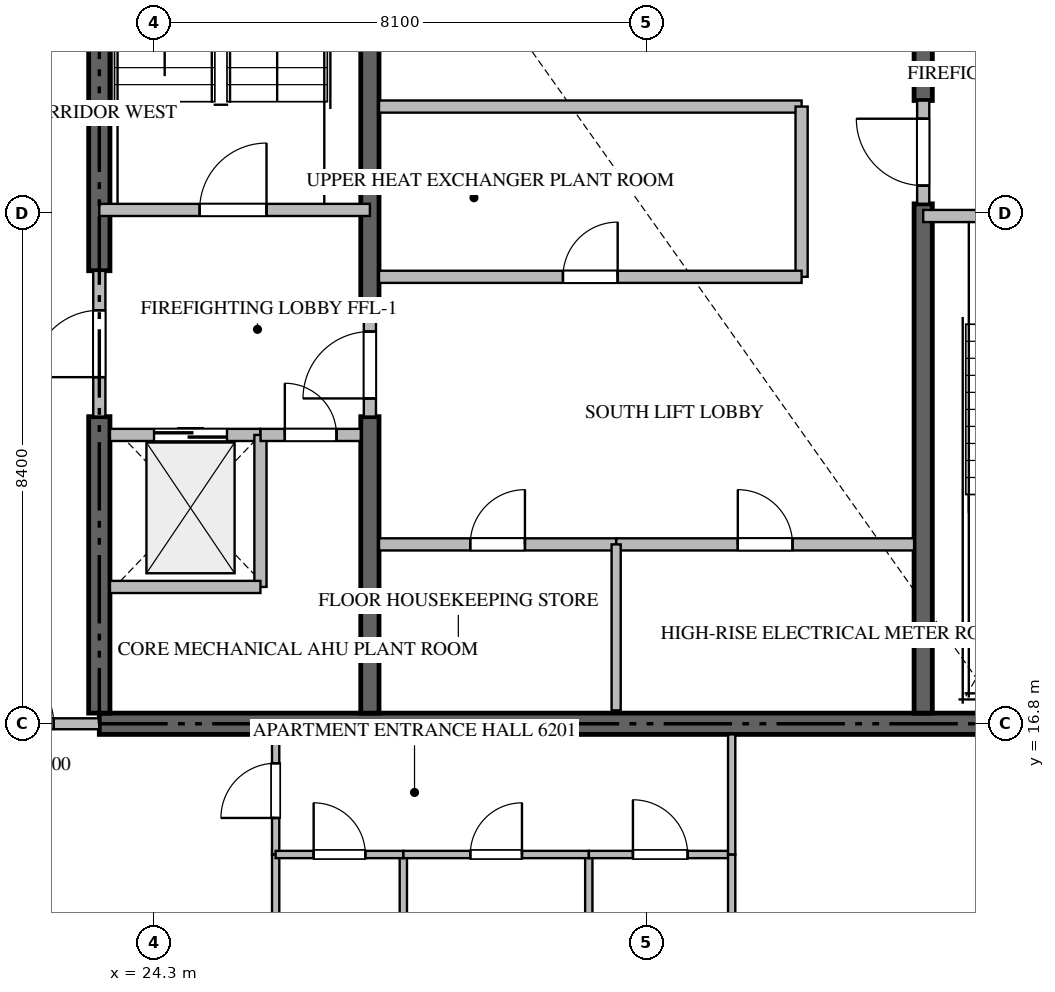
"""IFC4 building model, lengths in metres.
Left out: names, types, materials, properties, quantities, classifications, styles, units other than length and angle.
Written with IfcOpenShell. Run it as: python <this file> out.ifc"""

import sys

from ifc_helpers import new_model, si_unit, direction, frame, frame_2d, origin, place, context, subcontext, project, spatial, rectangle, extrude, source, transform, mapped, element, fill, save


model = new_model("IFC4")
c1 = context("Model", 3, precision=1e-05, world=origin(), true_north=direction((0.0, 1.0)))
c2 = subcontext(c1, "Body", "Model", "MODEL_VIEW")
j1 = project(units=[si_unit("LENGTHUNIT", "METRE"), si_unit("PLANEANGLEUNIT", "RADIAN")], contexts=[c1])
p1 = place(None, origin())
s1 = spatial("IfcSite", under=j1, at=p1, CompositionType="ELEMENT")
p2 = place(p1, origin())
s2 = spatial("IfcBuilding", under=s1, at=p2, CompositionType="ELEMENT")
p3 = place(p2, frame((0.0, 0.0, 248.95)))
s3 = spatial("IfcBuildingStorey", under=s2, at=p3, CompositionType="ELEMENT", Elevation=248.95)
p4 = place(p3, frame((23.4, 16.8, -0.26), z_axis=(0.0, 0.0, 1.0), x_axis=(1.0, 0.0, 0.0)))
e1 = element("IfcWall", 1, at=p4, inside=s3, PredefinedType="SHEAR", context=c2, shape_type="SweptSolid", body=[
    extrude(rectangle(XDim=18.0, YDim=0.35, at=frame_2d((9.0, 0.0))), origin(), (0.0, 0.0, 1.0), 3.848),
])
p5 = place(p3, frame((23.4, 16.975, -0.26), z_axis=(0.0, 0.0, 1.0), x_axis=(0.0, 1.0, 0.0)))
e2 = element("IfcWall", 2, at=p5, inside=s3, PredefinedType="SHEAR", context=c2, shape_type="SweptSolid", body=[
    extrude(rectangle(XDim=4.875, YDim=0.35, at=frame_2d((2.438, 0.0))), origin(), (0.0, 0.0, 1.0), 3.848),
])
p6 = place(p3, frame((23.4, 24.25, -0.26), z_axis=(0.0, 0.0, 1.0), x_axis=(0.0, 1.0, 0.0)))
e3 = element("IfcWall", 3, at=p6, inside=s3, PredefinedType="SHEAR", context=c2, shape_type="SweptSolid", body=[
    extrude(rectangle(XDim=9.175, YDim=0.35, at=frame_2d((4.587, 0.0))), origin(), (0.0, 0.0, 1.0), 3.848),
])
p7 = place(p3, frame((27.85, 16.975, -0.26), z_axis=(0.0, 0.0, 1.0), x_axis=(0.0, 1.0, 0.0)))
e4 = element("IfcWall", 4, at=p7, inside=s3, PredefinedType="SHEAR", context=c2, shape_type="SweptSolid", body=[
    extrude(rectangle(XDim=4.875, YDim=0.3, at=frame_2d((2.438, 0.0))), origin(), (0.0, 0.0, 1.0), 3.848),
])
p8 = place(p3, frame((27.85, 23.55, -0.26), z_axis=(0.0, 0.0, 1.0), x_axis=(0.0, 1.0, 0.0)))
e5 = element("IfcWall", 5, at=p8, inside=s3, PredefinedType="SHEAR", context=c2, shape_type="SweptSolid", body=[
    extrude(rectangle(XDim=9.875, YDim=0.3, at=frame_2d((4.938, 0.0))), origin(), (0.0, 0.0, 1.0), 3.848),
])
p9 = place(p3, frame((36.95, 16.975, -0.26), z_axis=(0.0, 0.0, 1.0), x_axis=(0.0, 1.0, 0.0)))
e6 = element("IfcWall", 6, at=p9, inside=s3, PredefinedType="SHEAR", context=c2, shape_type="SweptSolid", body=[
    extrude(rectangle(XDim=8.375, YDim=0.3, at=frame_2d((4.188, 0.0))), origin(), (0.0, 0.0, 1.0), 3.848),
])
p10 = place(p3, frame((36.95, 27.05, -0.26), z_axis=(0.0, 0.0, 1.0), x_axis=(0.0, 1.0, 0.0)))
e7 = element("IfcWall", 7, at=p10, inside=s3, PredefinedType="SHEAR", context=c2, shape_type="SweptSolid", body=[
    extrude(rectangle(XDim=6.375, YDim=0.3, at=frame_2d((3.188, 0.0))), origin(), (0.0, 0.0, 1.0), 3.848),
])
p11 = place(p3, frame((23.4, 25.25, 0.0), z_axis=(0.0, 0.0, 1.0), x_axis=(1.0, 0.0, 0.0)))
e8 = element("IfcWall", 8, at=p11, inside=s3, PredefinedType="STANDARD", context=c2, shape_type="SweptSolid", body=[
    extrude(rectangle(XDim=4.45, YDim=0.2, at=frame_2d((2.225, 0.0))), origin(), (0.0, 0.0, 1.0), 3.59),
])
p12 = place(p11, frame((1.65, 0.0, 0.0)))
e9 = element("IfcOpeningElement", 9, at=p12, cuts=e8, PredefinedType="OPENING", context=c2, shape_type="SweptSolid", body=[
    extrude(rectangle(XDim=1.1, YDim=2.15, at=frame_2d((0.55, 1.075))), frame((0.0, 0.11, 0.0), z_axis=(0.0, -1.0, 0.0), x_axis=(1.0, 0.0, 0.0)), (0.0, 0.0, 1.0), 0.22),
])
p13 = place(p3, frame((36.95, 25.15, 0.0), z_axis=(0.0, 0.0, 1.0), x_axis=(1.0, 0.0, 0.0)))
e10 = element("IfcWall", 10, at=p13, inside=s3, PredefinedType="STANDARD", context=c2, shape_type="SweptSolid", body=[
    extrude(rectangle(XDim=4.45, YDim=0.2, at=frame_2d((2.225, 0.0))), origin(), (0.0, 0.0, 1.0), 3.59),
])
p14 = place(p13, frame((1.65, 0.0, 0.0)))
e11 = element("IfcOpeningElement", 11, at=p14, cuts=e10, PredefinedType="OPENING", context=c2, shape_type="SweptSolid", body=[
    extrude(rectangle(XDim=1.1, YDim=2.15, at=frame_2d((0.55, 1.075))), frame((0.0, 0.11, 0.0), z_axis=(0.0, -1.0, 0.0), x_axis=(1.0, 0.0, 0.0)), (0.0, 0.0, 1.0), 0.22),
])
p15 = place(p3, frame((23.575, 21.55, 0.0), z_axis=(0.0, 0.0, 1.0), x_axis=(1.0, 0.0, 0.0)))
e12 = element("IfcWall", 12, at=p15, inside=s3, PredefinedType="STANDARD", context=c2, shape_type="SweptSolid", body=[
    extrude(rectangle(XDim=2.475, YDim=0.2, at=frame_2d((1.238, 0.0))), origin(), (0.0, 0.0, 1.0), 3.59),
])
p16 = place(p15, frame((0.725, 0.0, 0.0)))
e13 = element("IfcOpeningElement", 13, at=p16, cuts=e12, PredefinedType="OPENING", context=c2, shape_type="SweptSolid", body=[
    extrude(rectangle(XDim=1.2, YDim=2.2, at=frame_2d((0.6, 1.1))), frame((0.0, 0.11, 0.0), z_axis=(0.0, -1.0, 0.0), x_axis=(1.0, 0.0, 0.0)), (0.0, 0.0, 1.0), 0.22),
])
p17 = place(p3, frame((26.05, 19.05, 0.0), z_axis=(0.0, 0.0, 1.0), x_axis=(0.0, 1.0, 0.0)))
e14 = element("IfcWall", 14, at=p17, inside=s3, PredefinedType="STANDARD", context=c2, shape_type="SweptSolid", body=[
    extrude(rectangle(XDim=2.5, YDim=0.2, at=frame_2d((1.25, 0.0))), origin(), (0.0, 0.0, 1.0), 3.59),
])
p18 = place(p3, frame((23.575, 19.05, 0.0), z_axis=(0.0, 0.0, 1.0), x_axis=(1.0, 0.0, 0.0)))
e15 = element("IfcWall", 15, at=p18, inside=s3, PredefinedType="STANDARD", context=c2, shape_type="SweptSolid", body=[
    extrude(rectangle(XDim=2.475, YDim=0.2, at=frame_2d((1.238, 0.0))), origin(), (0.0, 0.0, 1.0), 3.59),
])
p19 = place(p3, frame((26.052, 21.55, 0.0), z_axis=(0.0, 0.0, 1.0), x_axis=(1.0, 0.0, 0.0)))
e16 = element("IfcWall", 16, at=p19, inside=s3, PredefinedType="STANDARD", context=c2, shape_type="SweptSolid", body=[
    extrude(rectangle(XDim=1.648, YDim=0.2, at=frame_2d((0.824, 0.0))), origin(), (0.0, 0.0, 1.0), 3.59),
])
p20 = place(p19, frame((0.399, 0.0, 0.0)))
e17 = element("IfcOpeningElement", 17, at=p20, cuts=e16, PredefinedType="OPENING", context=c2, shape_type="SweptSolid", body=[
    extrude(rectangle(XDim=0.85, YDim=2.1, at=frame_2d((0.425, 1.05))), frame((0.0, 0.11, 0.0), z_axis=(0.0, -1.0, 0.0), x_axis=(1.0, 0.0, 0.0)), (0.0, 0.0, 1.0), 0.22),
])
p21 = place(p3, frame((23.4, 21.852, 0.0), z_axis=(0.0, 0.0, 1.0), x_axis=(0.0, 1.0, 0.0)))
e18 = element("IfcWall", 18, at=p21, inside=s3, PredefinedType="STANDARD", context=c2, shape_type="SweptSolid", body=[
    extrude(rectangle(XDim=2.396, YDim=0.2, at=frame_2d((1.198, 0.0))), origin(), (0.0, 0.0, 1.0), 3.59),
])
p22 = place(p21, frame((0.648, 0.0, 0.0)))
e19 = element("IfcOpeningElement", 19, at=p22, cuts=e18, PredefinedType="OPENING", context=c2, shape_type="SweptSolid", body=[
    extrude(rectangle(XDim=1.1, YDim=2.15, at=frame_2d((0.55, 1.075))), frame((0.0, 0.11, 0.0), z_axis=(0.0, -1.0, 0.0), x_axis=(1.0, 0.0, 0.0)), (0.0, 0.0, 1.0), 0.22),
])
p23 = place(p3, frame((27.85, 21.852, 0.0), z_axis=(0.0, 0.0, 1.0), x_axis=(0.0, 1.0, 0.0)))
e20 = element("IfcWall", 20, at=p23, inside=s3, PredefinedType="STANDARD", context=c2, shape_type="SweptSolid", body=[
    extrude(rectangle(XDim=1.696, YDim=0.2, at=frame_2d((0.848, 0.0))), origin(), (0.0, 0.0, 1.0), 3.59),
])
p24 = place(p23, frame((0.298, 0.0, 0.0)))
e21 = element("IfcOpeningElement", 21, at=p24, cuts=e20, PredefinedType="OPENING", context=c2, shape_type="SweptSolid", body=[
    extrude(rectangle(XDim=1.1, YDim=2.15, at=frame_2d((0.55, 1.075))), frame((0.0, 0.11, 0.0), z_axis=(0.0, -1.0, 0.0), x_axis=(1.0, 0.0, 0.0)), (0.0, 0.0, 1.0), 0.22),
])
p25 = place(p3, frame((36.95, 25.352, 0.0), z_axis=(0.0, 0.0, 1.0), x_axis=(0.0, 1.0, 0.0)))
e22 = element("IfcWall", 22, at=p25, inside=s3, PredefinedType="STANDARD", context=c2, shape_type="SweptSolid", body=[
    extrude(rectangle(XDim=1.696, YDim=0.2, at=frame_2d((0.848, 0.0))), origin(), (0.0, 0.0, 1.0), 3.59),
])
p26 = place(p25, frame((0.298, 0.0, 0.0)))
e23 = element("IfcOpeningElement", 23, at=p26, cuts=e22, PredefinedType="OPENING", context=c2, shape_type="SweptSolid", body=[
    extrude(rectangle(XDim=1.1, YDim=2.15, at=frame_2d((0.55, 1.075))), frame((0.0, 0.11, 0.0), z_axis=(0.0, -1.0, 0.0), x_axis=(1.0, 0.0, 0.0)), (0.0, 0.0, 1.0), 0.22),
])
p27 = place(p3, frame((28.0, 19.75, 0.0), z_axis=(0.0, 0.0, 1.0), x_axis=(1.0, 0.0, 0.0)))
e24 = element("IfcWall", 24, at=p27, inside=s3, PredefinedType="STANDARD", context=c2, shape_type="SweptSolid", body=[
    extrude(rectangle(XDim=3.9, YDim=0.2, at=frame_2d((1.95, 0.0))), origin(), (0.0, 0.0, 1.0), 3.59),
])
p28 = place(p27, frame((1.5, 0.0, 0.0)))
e25 = element("IfcOpeningElement", 25, at=p28, cuts=e24, PredefinedType="OPENING", context=c2, shape_type="SweptSolid", body=[
    extrude(rectangle(XDim=0.9, YDim=2.1, at=frame_2d((0.45, 1.05))), frame((0.0, 0.11, 0.0), z_axis=(0.0, -1.0, 0.0), x_axis=(1.0, 0.0, 0.0)), (0.0, 0.0, 1.0), 0.22),
])
p29 = place(p3, frame((31.902, 19.75, 0.0), z_axis=(0.0, 0.0, 1.0), x_axis=(1.0, 0.0, 0.0)))
e26 = element("IfcWall", 26, at=p29, inside=s3, PredefinedType="STANDARD", context=c2, shape_type="SweptSolid", body=[
    extrude(rectangle(XDim=4.898, YDim=0.2, at=frame_2d((2.449, 0.0))), origin(), (0.0, 0.0, 1.0), 3.59),
])
p30 = place(p29, frame((1.999, 0.0, 0.0)))
e27 = element("IfcOpeningElement", 27, at=p30, cuts=e26, PredefinedType="OPENING", context=c2, shape_type="SweptSolid", body=[
    extrude(rectangle(XDim=0.9, YDim=2.1, at=frame_2d((0.45, 1.05))), frame((0.0, 0.11, 0.0), z_axis=(0.0, -1.0, 0.0), x_axis=(1.0, 0.0, 0.0)), (0.0, 0.0, 1.0), 0.22),
])
p31 = place(p3, frame((31.9, 17.02, 0.0), z_axis=(0.0, 0.0, 1.0), x_axis=(0.0, 1.0, 0.0)))
e28 = element("IfcWall", 28, at=p31, inside=s3, PredefinedType="PARTITIONING", context=c2, shape_type="SweptSolid", body=[
    extrude(rectangle(XDim=2.73, YDim=0.15, at=frame_2d((1.365, 0.0))), origin(), (0.0, 0.0, 1.0), 3.59),
])
p32 = place(p3, frame((28.0, 26.95, 0.0), z_axis=(0.0, 0.0, 1.0), x_axis=(1.0, 0.0, 0.0)))
e29 = element("IfcWall", 29, at=p32, inside=s3, PredefinedType="STANDARD", context=c2, shape_type="SweptSolid", body=[
    extrude(rectangle(XDim=6.95, YDim=0.2, at=frame_2d((3.475, 0.0))), origin(), (0.0, 0.0, 1.0), 3.59),
])
p33 = place(p3, frame((34.95, 24.15, 0.0), z_axis=(0.0, 0.0, 1.0), x_axis=(0.0, 1.0, 0.0)))
e30 = element("IfcWall", 30, at=p33, inside=s3, PredefinedType="STANDARD", context=c2, shape_type="SweptSolid", body=[
    extrude(rectangle(XDim=2.8, YDim=0.2, at=frame_2d((1.4, 0.0))), origin(), (0.0, 0.0, 1.0), 3.59),
])
p34 = place(p3, frame((28.0, 24.15, 0.0), z_axis=(0.0, 0.0, 1.0), x_axis=(1.0, 0.0, 0.0)))
e31 = element("IfcWall", 31, at=p34, inside=s3, PredefinedType="STANDARD", context=c2, shape_type="SweptSolid", body=[
    extrude(rectangle(XDim=6.95, YDim=0.2, at=frame_2d((3.475, 0.0))), origin(), (0.0, 0.0, 1.0), 3.59),
])
p35 = place(p34, frame((3.025, 0.0, 0.0)))
e32 = element("IfcOpeningElement", 32, at=p35, cuts=e31, PredefinedType="OPENING", context=c2, shape_type="SweptSolid", body=[
    extrude(rectangle(XDim=0.9, YDim=2.1, at=frame_2d((0.45, 1.05))), frame((0.0, 0.11, 0.0), z_axis=(0.0, -1.0, 0.0), x_axis=(1.0, 0.0, 0.0)), (0.0, 0.0, 1.0), 0.22),
])
p36 = place(p3, frame((20.902, 16.8, 0.0), z_axis=(0.0, 0.0, 1.0), x_axis=(1.0, 0.0, 0.0)))
e33 = element("IfcWall", 33, at=p36, inside=s3, PredefinedType="PARTITIONING", context=c2, shape_type="SweptSolid", body=[
    extrude(rectangle(XDim=2.496, YDim=0.18, at=frame_2d((1.248, 0.0))), origin(), (0.0, 0.0, 1.0), 3.59),
])
p37 = place(p36, frame((0.748, 0.0, 0.0)))
e34 = element("IfcOpeningElement", 34, at=p37, cuts=e33, PredefinedType="OPENING", context=c2, shape_type="SweptSolid", body=[
    extrude(rectangle(XDim=1.0, YDim=2.15, at=frame_2d((0.5, 1.075))), frame((0.0, 0.1, 0.0), z_axis=(0.0, -1.0, 0.0), x_axis=(1.0, 0.0, 0.0)), (0.0, 0.0, 1.0), 0.2),
])
p38 = place(p3, frame((26.3, 14.65, 0.0), z_axis=(0.0, 0.0, 1.0), x_axis=(0.0, 1.0, 0.0)))
e35 = element("IfcWall", 35, at=p38, inside=s3, PredefinedType="PARTITIONING", context=c2, shape_type="SweptSolid", body=[
    extrude(rectangle(XDim=1.975, YDim=0.12, at=frame_2d((0.988, 0.0))), origin(), (0.0, 0.0, 1.0), 3.59),
])
p39 = place(p38, frame((0.601, 0.0, 0.0)))
e36 = element("IfcOpeningElement", 36, at=p39, cuts=e35, PredefinedType="OPENING", context=c2, shape_type="SweptSolid", body=[
    extrude(rectangle(XDim=0.9, YDim=2.1, at=frame_2d((0.45, 1.05))), frame((0.0, 0.07, 0.0), z_axis=(0.0, -1.0, 0.0), x_axis=(1.0, 0.0, 0.0)), (0.0, 0.0, 1.0), 0.14),
])
p40 = place(p3, frame((26.3, 7.862, 0.0), z_axis=(0.0, 0.0, 1.0), x_axis=(0.0, 1.0, 0.0)))
e37 = element("IfcWall", 37, at=p40, inside=s3, PredefinedType="PARTITIONING", context=c2, shape_type="SweptSolid", body=[
    extrude(rectangle(XDim=6.786, YDim=0.12, at=frame_2d((3.393, 0.0))), origin(), (0.0, 0.0, 1.0), 3.59),
])
p41 = place(p3, frame((31.45, 1.295, 0.0), z_axis=(0.0, 0.0, 1.0), x_axis=(0.0, 1.0, 0.0)))
e38 = element("IfcWall", 38, at=p41, inside=s3, PredefinedType="PARTITIONING", context=c2, shape_type="SweptSolid", body=[
    extrude(rectangle(XDim=13.355, YDim=0.12, at=frame_2d((6.677, 0.0))), origin(), (0.0, 0.0, 1.0), 3.59),
])
p42 = place(p3, frame((28.4, 7.86, 0.0), z_axis=(0.0, 0.0, 1.0), x_axis=(0.0, 1.0, 0.0)))
e39 = element("IfcWall", 39, at=p42, inside=s3, PredefinedType="PARTITIONING", context=c2, shape_type="SweptSolid", body=[
    extrude(rectangle(XDim=6.79, YDim=0.12, at=frame_2d((3.395, 0.0))), origin(), (0.0, 0.0, 1.0), 3.59),
])
p43 = place(p3, frame((26.3, 14.65, 0.0), z_axis=(0.0, 0.0, 1.0), x_axis=(1.0, 0.0, 0.0)))
e40 = element("IfcWall", 40, at=p43, inside=s3, PredefinedType="PARTITIONING", context=c2, shape_type="SweptSolid", body=[
    extrude(rectangle(XDim=2.1, YDim=0.12, at=frame_2d((1.05, 0.0))), origin(), (0.0, 0.0, 1.0), 3.59),
])
p44 = place(p43, frame((0.625, 0.0, 0.0)))
e41 = element("IfcOpeningElement", 41, at=p44, cuts=e40, PredefinedType="OPENING", context=c2, shape_type="SweptSolid", body=[
    extrude(rectangle(XDim=0.85, YDim=2.1, at=frame_2d((0.425, 1.05))), frame((0.0, 0.07, 0.0), z_axis=(0.0, -1.0, 0.0), x_axis=(1.0, 0.0, 0.0)), (0.0, 0.0, 1.0), 0.14),
])
p45 = place(p3, frame((28.402, 14.65, 0.0), z_axis=(0.0, 0.0, 1.0), x_axis=(1.0, 0.0, 0.0)))
e42 = element("IfcWall", 42, at=p45, inside=s3, PredefinedType="PARTITIONING", context=c2, shape_type="SweptSolid", body=[
    extrude(rectangle(XDim=3.048, YDim=0.12, at=frame_2d((1.524, 0.0))), origin(), (0.0, 0.0, 1.0), 3.59),
])
p46 = place(p45, frame((1.099, 0.0, 0.0)))
e43 = element("IfcOpeningElement", 43, at=p46, cuts=e42, PredefinedType="OPENING", context=c2, shape_type="SweptSolid", body=[
    extrude(rectangle(XDim=0.85, YDim=2.1, at=frame_2d((0.425, 1.05))), frame((0.0, 0.07, 0.0), z_axis=(0.0, -1.0, 0.0), x_axis=(1.0, 0.0, 0.0)), (0.0, 0.0, 1.0), 0.14),
])
p47 = place(p3, frame((31.452, 14.65, 0.0), z_axis=(0.0, 0.0, 1.0), x_axis=(1.0, 0.0, 0.0)))
e44 = element("IfcWall", 44, at=p47, inside=s3, PredefinedType="PARTITIONING", context=c2, shape_type="SweptSolid", body=[
    extrude(rectangle(XDim=2.348, YDim=0.12, at=frame_2d((1.174, 0.0))), origin(), (0.0, 0.0, 1.0), 3.59),
])
p48 = place(p47, frame((0.724, 0.0, 0.0)))
e45 = element("IfcOpeningElement", 45, at=p48, cuts=e44, PredefinedType="OPENING", context=c2, shape_type="SweptSolid", body=[
    extrude(rectangle(XDim=0.9, YDim=2.1, at=frame_2d((0.45, 1.05))), frame((0.0, 0.07, 0.0), z_axis=(0.0, -1.0, 0.0), x_axis=(1.0, 0.0, 0.0)), (0.0, 0.0, 1.0), 0.14),
])
p49 = place(p3, frame((33.8, 8.59, 0.0), z_axis=(0.0, 0.0, 1.0), x_axis=(0.0, 1.0, 0.0)))
e46 = element("IfcWall", 46, at=p49, inside=s3, PredefinedType="PARTITIONING", context=c2, shape_type="SweptSolid", body=[
    extrude(rectangle(XDim=6.06, YDim=0.12, at=frame_2d((3.03, 0.0))), origin(), (0.0, 0.0, 1.0), 3.59),
])
p50 = place(p49, frame((2.605, 0.0, 0.0)))
e47 = element("IfcOpeningElement", 47, at=p50, cuts=e46, PredefinedType="OPENING", context=c2, shape_type="SweptSolid", body=[
    extrude(rectangle(XDim=0.85, YDim=2.1, at=frame_2d((0.425, 1.05))), frame((0.0, 0.07, 0.0), z_axis=(0.0, -1.0, 0.0), x_axis=(1.0, 0.0, 0.0)), (0.0, 0.0, 1.0), 0.14),
])
p51 = place(p3, frame((33.8, 14.652, 0.0), z_axis=(0.0, 0.0, 1.0), x_axis=(0.0, 1.0, 0.0)))
e48 = element("IfcWall", 48, at=p51, inside=s3, PredefinedType="PARTITIONING", context=c2, shape_type="SweptSolid", body=[
    extrude(rectangle(XDim=1.973, YDim=0.12, at=frame_2d((0.986, 0.0))), origin(), (0.0, 0.0, 1.0), 3.59),
])
m1 = source(origin(), c2, "Body", "SweptSolid", [
    extrude(rectangle(XDim=1.1, YDim=2.15, at=frame_2d((0.55, 1.075))), frame((0.0, 0.025, 0.0), z_axis=(0.0, -1.0, 0.0), x_axis=(1.0, 0.0, 0.0)), (0.0, 0.0, 1.0), 0.05),
])
p52 = place(p12, origin())
e49 = element("IfcDoor", 49, at=p52, inside=s3, OperationType="SINGLE_SWING_RIGHT", PredefinedType="DOOR", context=c2, shape_type="MappedRepresentation", body=[
    mapped(m1, transform((0.0, 0.0, 0.0), scale=1.0)),
])
fill(e9, e49)
m2 = source(origin(), c2, "Body", "SweptSolid", [
    extrude(rectangle(XDim=1.2, YDim=2.2, at=frame_2d((0.6, 1.1))), frame((0.0, 0.025, 0.0), z_axis=(0.0, -1.0, 0.0), x_axis=(1.0, 0.0, 0.0)), (0.0, 0.0, 1.0), 0.05),
])
p53 = place(p16, origin())
e50 = element("IfcDoor", 50, at=p53, inside=s3, OperationType="DOUBLE_DOOR_SLIDING", PredefinedType="DOOR", context=c2, shape_type="MappedRepresentation", body=[
    mapped(m2, transform((0.0, 0.0, 0.0), scale=1.0)),
])
fill(e13, e50)
m3 = source(origin(), c2, "Body", "SweptSolid", [
    extrude(rectangle(XDim=0.85, YDim=2.1, at=frame_2d((0.425, 1.05))), frame((0.0, 0.025, 0.0), z_axis=(0.0, -1.0, 0.0), x_axis=(1.0, 0.0, 0.0)), (0.0, 0.0, 1.0), 0.05),
])
p54 = place(p20, origin())
e51 = element("IfcDoor", 51, at=p54, inside=s3, OperationType="SINGLE_SWING_LEFT", PredefinedType="DOOR", context=c2, shape_type="MappedRepresentation", body=[
    mapped(m3, transform((0.0, 0.0, 0.0), scale=1.0)),
])
fill(e17, e51)
p55 = place(p22, origin())
e52 = element("IfcDoor", 52, at=p55, inside=s3, OperationType="SINGLE_SWING_LEFT", PredefinedType="DOOR", context=c2, shape_type="MappedRepresentation", body=[
    mapped(m1, transform((0.0, 0.0, 0.0), scale=1.0)),
])
fill(e19, e52)
p56 = place(p24, origin())
e53 = element("IfcDoor", 53, at=p56, inside=s3, OperationType="SINGLE_SWING_LEFT", PredefinedType="DOOR", context=c2, shape_type="MappedRepresentation", body=[
    mapped(m1, transform((0.0, 0.0, 0.0), scale=1.0)),
])
fill(e21, e53)
p57 = place(p26, origin())
e54 = element("IfcDoor", 54, at=p57, inside=s3, OperationType="SINGLE_SWING_RIGHT", PredefinedType="DOOR", context=c2, shape_type="MappedRepresentation", body=[
    mapped(m1, transform((0.0, 0.0, 0.0), scale=1.0)),
])
fill(e23, e54)
m4 = source(origin(), c2, "Body", "SweptSolid", [
    extrude(rectangle(XDim=0.9, YDim=2.1, at=frame_2d((0.45, 1.05))), frame((0.0, 0.025, 0.0), z_axis=(0.0, -1.0, 0.0), x_axis=(1.0, 0.0, 0.0)), (0.0, 0.0, 1.0), 0.05),
])
p58 = place(p28, origin())
e55 = element("IfcDoor", 55, at=p58, inside=s3, OperationType="SINGLE_SWING_RIGHT", PredefinedType="DOOR", context=c2, shape_type="MappedRepresentation", body=[
    mapped(m4, transform((0.0, 0.0, 0.0), scale=1.0)),
])
fill(e25, e55)
p59 = place(p30, origin())
e56 = element("IfcDoor", 56, at=p59, inside=s3, OperationType="SINGLE_SWING_LEFT", PredefinedType="DOOR", context=c2, shape_type="MappedRepresentation", body=[
    mapped(m4, transform((0.0, 0.0, 0.0), scale=1.0)),
])
fill(e27, e56)
p60 = place(p35, origin())
e57 = element("IfcDoor", 57, at=p60, inside=s3, OperationType="SINGLE_SWING_RIGHT", PredefinedType="DOOR", context=c2, shape_type="MappedRepresentation", body=[
    mapped(m4, transform((0.0, 0.0, 0.0), scale=1.0)),
])
fill(e32, e57)
m5 = source(origin(), c2, "Body", "SweptSolid", [
    extrude(rectangle(XDim=1.0, YDim=2.15, at=frame_2d((0.5, 1.075))), frame((0.0, 0.025, 0.0), z_axis=(0.0, -1.0, 0.0), x_axis=(1.0, 0.0, 0.0)), (0.0, 0.0, 1.0), 0.05),
])
p61 = place(p37, origin())
e58 = element("IfcDoor", 58, at=p61, inside=s3, OperationType="SINGLE_SWING_LEFT", PredefinedType="DOOR", context=c2, shape_type="MappedRepresentation", body=[
    mapped(m5, transform((0.0, 0.0, 0.0), scale=1.0)),
])
fill(e34, e58)
p62 = place(p39, origin())
e59 = element("IfcDoor", 59, at=p62, inside=s3, OperationType="SINGLE_SWING_LEFT", PredefinedType="DOOR", context=c2, shape_type="MappedRepresentation", body=[
    mapped(m4, transform((0.0, 0.0, 0.0), scale=1.0)),
])
fill(e36, e59)
p63 = place(p44, origin())
e60 = element("IfcDoor", 60, at=p63, inside=s3, OperationType="SINGLE_SWING_LEFT", PredefinedType="DOOR", context=c2, shape_type="MappedRepresentation", body=[
    mapped(m3, transform((0.0, 0.0, 0.0), scale=1.0)),
])
fill(e41, e60)
p64 = place(p46, origin())
e61 = element("IfcDoor", 61, at=p64, inside=s3, OperationType="SINGLE_SWING_RIGHT", PredefinedType="DOOR", context=c2, shape_type="MappedRepresentation", body=[
    mapped(m3, transform((0.0, 0.0, 0.0), scale=1.0)),
])
fill(e43, e61)
p65 = place(p48, origin())
e62 = element("IfcDoor", 62, at=p65, inside=s3, OperationType="SINGLE_SWING_LEFT", PredefinedType="DOOR", context=c2, shape_type="MappedRepresentation", body=[
    mapped(m4, transform((0.0, 0.0, 0.0), scale=1.0)),
])
fill(e45, e62)
save(model, sys.argv[1])
